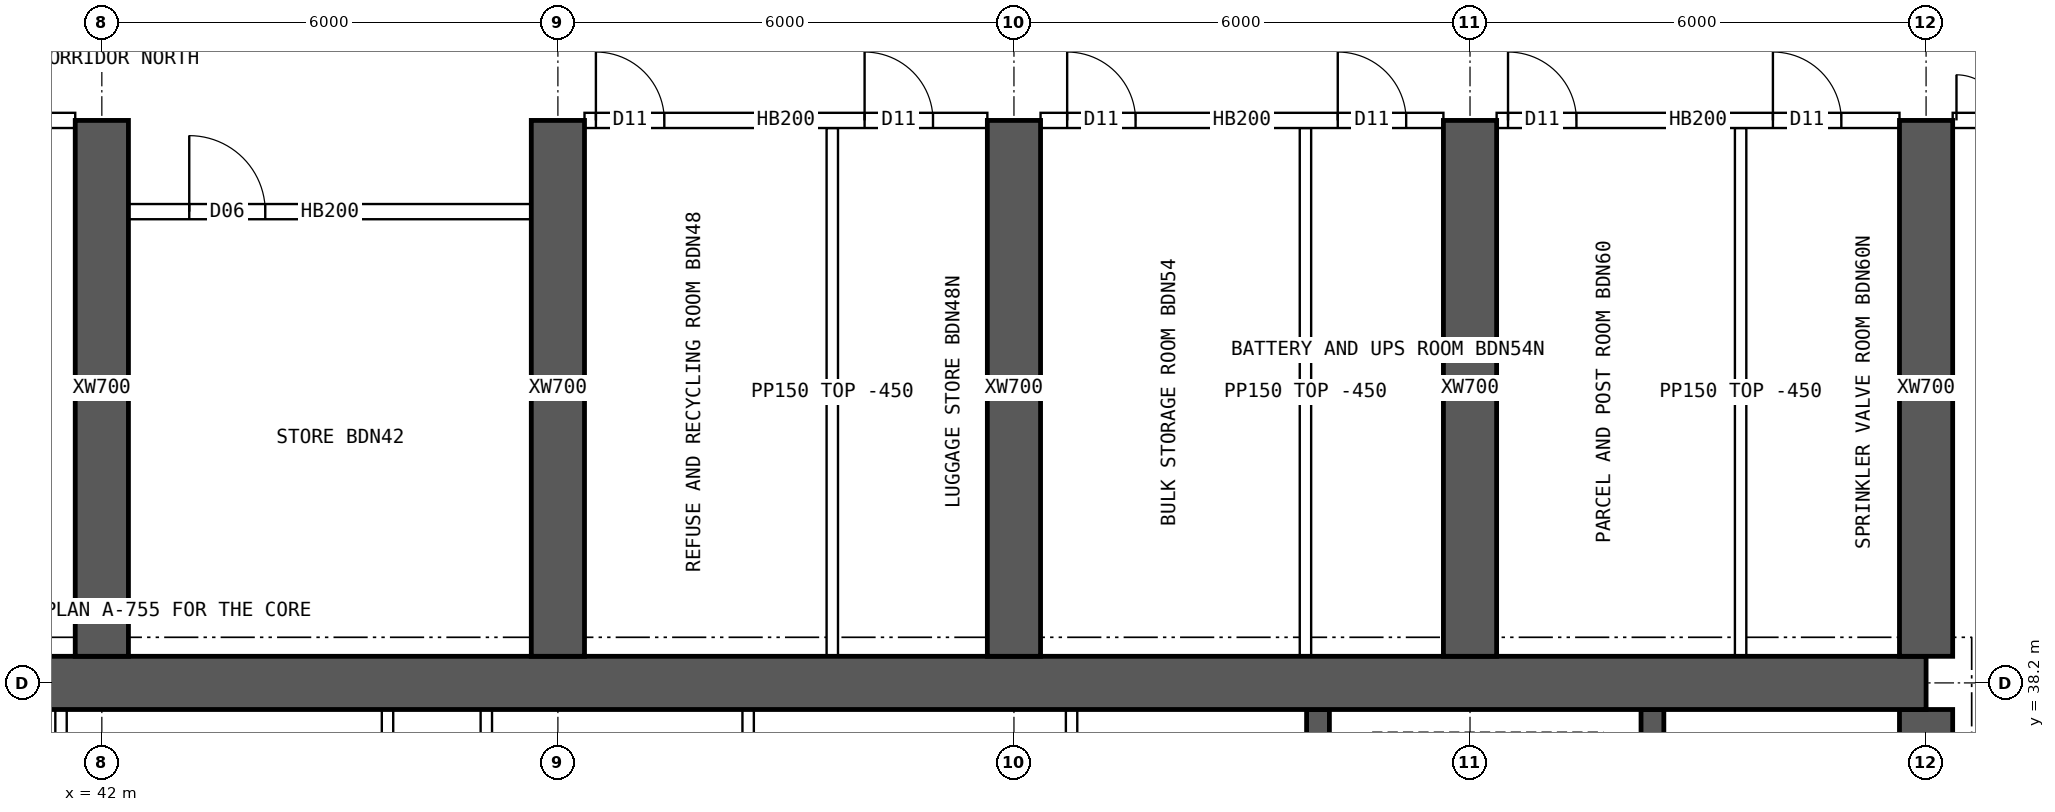
"""IFC4 building model, lengths in metres.
Left out: names, types, materials, properties, quantities, classifications, styles, units other than length and angle.
Written with IfcOpenShell. Run it as: python <this file> out.ifc"""

import sys

from ifc_helpers import new_model, si_unit, direction, frame, frame_2d, origin, place, context, subcontext, project, spatial, rectangle, extrude, element, fill, save


model = new_model("IFC4")
c1 = context("Model", 3, precision=1e-05, world=origin(), true_north=direction((0.0, 1.0)))
c2 = subcontext(c1, "Body", "Model", "MODEL_VIEW")
j1 = project(units=[si_unit("LENGTHUNIT", "METRE"), si_unit("PLANEANGLEUNIT", "RADIAN")], contexts=[c1])
p1 = place(None, origin())
s1 = spatial("IfcSite", under=j1, at=p1, CompositionType="ELEMENT")
p2 = place(p1, origin())
s2 = spatial("IfcBuilding", under=s1, at=p2, CompositionType="ELEMENT")
p3 = place(p2, frame((0.0, 0.0, 212.8)))
s3 = spatial("IfcBuildingStorey", under=s2, at=p3, CompositionType="ELEMENT", Elevation=212.8)
p4 = place(p3, frame((18.0, 38.2, 0.0), z_axis=(0.0, 0.0, 1.0), x_axis=(1.0, 0.0, 0.0)))
e1 = element("IfcWall", 1, at=p4, inside=s3, PredefinedType="SHEAR", context=c2, shape_type="SweptSolid", body=[
    extrude(rectangle(XDim=48.0, YDim=0.7, at=frame_2d((24.0, 0.0))), origin(), (0.0, 0.0, 1.0), 3.75),
])
p5 = place(p3, frame((66.0, 26.15, 0.0), z_axis=(0.0, 0.0, 1.0), x_axis=(0.0, 1.0, 0.0)))
e2 = element("IfcWall", 2, at=p5, inside=s3, PredefinedType="SHEAR", context=c2, shape_type="SweptSolid", body=[
    extrude(rectangle(XDim=11.7, YDim=0.7, at=frame_2d((5.85, 0.0))), origin(), (0.0, 0.0, 1.0), 3.75),
])
p6 = place(p5, frame((5.15, 0.0, 0.0)))
e3 = element("IfcOpeningElement", 3, at=p6, cuts=e2, PredefinedType="OPENING", context=c2, shape_type="SweptSolid", body=[
    extrude(rectangle(XDim=1.2, YDim=2.1, at=frame_2d((0.6, 1.05))), frame((0.0, 0.36, 0.0), z_axis=(0.0, -1.0, 0.0), x_axis=(1.0, 0.0, 0.0)), (0.0, 0.0, 1.0), 0.72),
])
for number, where, z_axis, x_axis in (
    (4, (62.4, 34.75, 0.0), (0.0, 0.0, 1.0), (0.0, 1.0, 0.0)),
    (5, (58.0, 34.75, 0.0), (0.0, 0.0, 1.0), (0.0, 1.0, 0.0)),
):
    element("IfcWall", number, at=place(p3, frame(where, z_axis=z_axis, x_axis=x_axis)), inside=s3, PredefinedType="SHEAR", context=c2, shape_type="SweptSolid", body=[
        extrude(rectangle(XDim=3.1, YDim=0.3, at=frame_2d((1.55, 0.0))), origin(), (0.0, 0.0, 1.0), 3.75),
    ])
for number, where, z_axis, x_axis in (
    (6, (42.0, 38.55, 0.0), (0.0, 0.0, 1.0), (0.0, 1.0, 0.0)),
    (7, (48.0, 38.55, 0.0), (0.0, 0.0, 1.0), (0.0, 1.0, 0.0)),
    (8, (54.0, 38.55, 0.0), (0.0, 0.0, 1.0), (0.0, 1.0, 0.0)),
    (9, (60.0, 38.55, 0.0), (0.0, 0.0, 1.0), (0.0, 1.0, 0.0)),
    (10, (66.0, 38.55, 0.0), (0.0, 0.0, 1.0), (0.0, 1.0, 0.0)),
):
    element("IfcWall", number, at=place(p3, frame(where, z_axis=z_axis, x_axis=x_axis)), inside=s3, PredefinedType="SHEAR", context=c2, shape_type="SweptSolid", body=[
        extrude(rectangle(XDim=7.05, YDim=0.7, at=frame_2d((3.525, 0.0))), origin(), (0.0, 0.0, 1.0), 3.75),
    ])
for number, where, z_axis, x_axis in (
    (11, (41.463, 34.75, 0.0), (0.0, 0.0, 1.0), (0.0, 1.0, 0.0)),
    (12, (45.758, 34.75, 0.0), (0.0, 0.0, 1.0), (0.0, 1.0, 0.0)),
    (13, (47.058, 34.75, 0.0), (0.0, 0.0, 1.0), (0.0, 1.0, 0.0)),
    (14, (50.503, 34.75, 0.0), (0.0, 0.0, 1.0), (0.0, 1.0, 0.0)),
    (15, (54.758, 34.75, 0.0), (0.0, 0.0, 1.0), (0.0, 1.0, 0.0)),
):
    element("IfcWall", number, at=place(p3, frame(where, z_axis=z_axis, x_axis=x_axis)), inside=s3, PredefinedType="SOLIDWALL", context=c2, shape_type="SweptSolid", body=[
        extrude(rectangle(XDim=3.1, YDim=0.15, at=frame_2d((1.55, 0.0))), origin(), (0.0, 0.0, 1.0), 3.3),
    ])
p7 = place(p3, frame((36.35, 45.6, 0.0), z_axis=(0.0, 0.0, 1.0), x_axis=(1.0, 0.0, 0.0)))
e16 = element("IfcWall", 16, at=p7, inside=s3, PredefinedType="SOLIDWALL", context=c2, shape_type="SweptSolid", body=[
    extrude(rectangle(XDim=5.3, YDim=0.2, at=frame_2d((2.65, 0.0))), origin(), (0.0, 0.0, 1.0), 3.3),
])
p8 = place(p7, frame((0.15, 0.0, 0.0)))
e17 = element("IfcOpeningElement", 17, at=p8, cuts=e16, PredefinedType="OPENING", context=c2, shape_type="SweptSolid", body=[
    extrude(rectangle(XDim=0.9, YDim=2.1, at=frame_2d((0.45, 1.05))), frame((0.0, 0.11, 0.0), z_axis=(0.0, -1.0, 0.0), x_axis=(1.0, 0.0, 0.0)), (0.0, 0.0, 1.0), 0.22),
])
p9 = place(p7, frame((2.15, 0.0, 0.0)))
e18 = element("IfcOpeningElement", 18, at=p9, cuts=e16, PredefinedType="OPENING", context=c2, shape_type="SweptSolid", body=[
    extrude(rectangle(XDim=0.9, YDim=2.1, at=frame_2d((0.45, 1.05))), frame((0.0, 0.11, 0.0), z_axis=(0.0, -1.0, 0.0), x_axis=(1.0, 0.0, 0.0)), (0.0, 0.0, 1.0), 0.22),
])
p10 = place(p3, frame((48.35, 45.6, 0.0), z_axis=(0.0, 0.0, 1.0), x_axis=(1.0, 0.0, 0.0)))
e19 = element("IfcWall", 19, at=p10, inside=s3, PredefinedType="SOLIDWALL", context=c2, shape_type="SweptSolid", body=[
    extrude(rectangle(XDim=5.3, YDim=0.2, at=frame_2d((2.65, 0.0))), origin(), (0.0, 0.0, 1.0), 3.3),
])
p11 = place(p10, frame((0.15, 0.0, 0.0)))
e20 = element("IfcOpeningElement", 20, at=p11, cuts=e19, PredefinedType="OPENING", context=c2, shape_type="SweptSolid", body=[
    extrude(rectangle(XDim=0.9, YDim=2.1, at=frame_2d((0.45, 1.05))), frame((0.0, 0.11, 0.0), z_axis=(0.0, -1.0, 0.0), x_axis=(1.0, 0.0, 0.0)), (0.0, 0.0, 1.0), 0.22),
])
p12 = place(p10, frame((3.685, 0.0, 0.0)))
e21 = element("IfcOpeningElement", 21, at=p12, cuts=e19, PredefinedType="OPENING", context=c2, shape_type="SweptSolid", body=[
    extrude(rectangle(XDim=0.9, YDim=2.1, at=frame_2d((0.45, 1.05))), frame((0.0, 0.11, 0.0), z_axis=(0.0, -1.0, 0.0), x_axis=(1.0, 0.0, 0.0)), (0.0, 0.0, 1.0), 0.22),
])
p13 = place(p3, frame((54.35, 45.6, 0.0), z_axis=(0.0, 0.0, 1.0), x_axis=(1.0, 0.0, 0.0)))
e22 = element("IfcWall", 22, at=p13, inside=s3, PredefinedType="SOLIDWALL", context=c2, shape_type="SweptSolid", body=[
    extrude(rectangle(XDim=5.3, YDim=0.2, at=frame_2d((2.65, 0.0))), origin(), (0.0, 0.0, 1.0), 3.3),
])
p14 = place(p13, frame((0.35, 0.0, 0.0)))
e23 = element("IfcOpeningElement", 23, at=p14, cuts=e22, PredefinedType="OPENING", context=c2, shape_type="SweptSolid", body=[
    extrude(rectangle(XDim=0.9, YDim=2.1, at=frame_2d((0.45, 1.05))), frame((0.0, 0.11, 0.0), z_axis=(0.0, -1.0, 0.0), x_axis=(1.0, 0.0, 0.0)), (0.0, 0.0, 1.0), 0.22),
])
p15 = place(p13, frame((3.91, 0.0, 0.0)))
e24 = element("IfcOpeningElement", 24, at=p15, cuts=e22, PredefinedType="OPENING", context=c2, shape_type="SweptSolid", body=[
    extrude(rectangle(XDim=0.9, YDim=2.1, at=frame_2d((0.45, 1.05))), frame((0.0, 0.11, 0.0), z_axis=(0.0, -1.0, 0.0), x_axis=(1.0, 0.0, 0.0)), (0.0, 0.0, 1.0), 0.22),
])
p16 = place(p3, frame((60.35, 45.6, 0.0), z_axis=(0.0, 0.0, 1.0), x_axis=(1.0, 0.0, 0.0)))
e25 = element("IfcWall", 25, at=p16, inside=s3, PredefinedType="SOLIDWALL", context=c2, shape_type="SweptSolid", body=[
    extrude(rectangle(XDim=5.3, YDim=0.2, at=frame_2d((2.65, 0.0))), origin(), (0.0, 0.0, 1.0), 3.3),
])
p17 = place(p16, frame((0.15, 0.0, 0.0)))
e26 = element("IfcOpeningElement", 26, at=p17, cuts=e25, PredefinedType="OPENING", context=c2, shape_type="SweptSolid", body=[
    extrude(rectangle(XDim=0.9, YDim=2.1, at=frame_2d((0.45, 1.05))), frame((0.0, 0.11, 0.0), z_axis=(0.0, -1.0, 0.0), x_axis=(1.0, 0.0, 0.0)), (0.0, 0.0, 1.0), 0.22),
])
p18 = place(p16, frame((3.635, 0.0, 0.0)))
e27 = element("IfcOpeningElement", 27, at=p18, cuts=e25, PredefinedType="OPENING", context=c2, shape_type="SweptSolid", body=[
    extrude(rectangle(XDim=0.9, YDim=2.1, at=frame_2d((0.45, 1.05))), frame((0.0, 0.11, 0.0), z_axis=(0.0, -1.0, 0.0), x_axis=(1.0, 0.0, 0.0)), (0.0, 0.0, 1.0), 0.22),
])
p19 = place(p3, frame((66.35, 45.6, 0.0), z_axis=(0.0, 0.0, 1.0), x_axis=(1.0, 0.0, 0.0)))
e28 = element("IfcWall", 28, at=p19, inside=s3, PredefinedType="SOLIDWALL", context=c2, shape_type="SweptSolid", body=[
    extrude(rectangle(XDim=2.05, YDim=0.2, at=frame_2d((1.025, 0.0))), origin(), (0.0, 0.0, 1.0), 3.3),
])
p20 = place(p19, frame((0.05, 0.0, 0.0)))
e29 = element("IfcOpeningElement", 29, at=p20, cuts=e28, PredefinedType="OPENING", context=c2, shape_type="SweptSolid", body=[
    extrude(rectangle(XDim=1.2, YDim=2.1, at=frame_2d((0.6, 1.05))), frame((0.0, 0.11, 0.0), z_axis=(0.0, -1.0, 0.0), x_axis=(1.0, 0.0, 0.0)), (0.0, 0.0, 1.0), 0.22),
])
p21 = place(p3, frame((42.35, 44.4, 0.0), z_axis=(0.0, 0.0, 1.0), x_axis=(1.0, 0.0, 0.0)))
e30 = element("IfcWall", 30, at=p21, inside=s3, PredefinedType="SOLIDWALL", context=c2, shape_type="SweptSolid", body=[
    extrude(rectangle(XDim=5.3, YDim=0.2, at=frame_2d((2.65, 0.0))), origin(), (0.0, 0.0, 1.0), 3.3),
])
p22 = place(p21, frame((0.8, 0.0, 0.0)))
e31 = element("IfcOpeningElement", 31, at=p22, cuts=e30, PredefinedType="OPENING", context=c2, shape_type="SweptSolid", body=[
    extrude(rectangle(XDim=1.0, YDim=2.1, at=frame_2d((0.5, 1.05))), frame((0.0, 0.11, 0.0), z_axis=(0.0, -1.0, 0.0), x_axis=(1.0, 0.0, 0.0)), (0.0, 0.0, 1.0), 0.22),
])
for number, where, z_axis, x_axis in (
    (32, (51.61, 38.55, 0.0), (0.0, 0.0, 1.0), (0.0, 1.0, 0.0)),
    (33, (57.835, 38.55, 0.0), (0.0, 0.0, 1.0), (0.0, 1.0, 0.0)),
    (34, (63.56, 38.55, 0.0), (0.0, 0.0, 1.0), (0.0, 1.0, 0.0)),
):
    element("IfcWall", number, at=place(p3, frame(where, z_axis=z_axis, x_axis=x_axis)), inside=s3, PredefinedType="PARTITIONING", context=c2, shape_type="SweptSolid", body=[
        extrude(rectangle(XDim=6.95, YDim=0.15, at=frame_2d((3.475, 0.0))), origin(), (0.0, 0.0, 1.0), 3.3),
    ])
p23 = place(p20, origin())
e35 = element("IfcDoor", 35, at=p23, inside=s3, OperationType="DOUBLE_DOOR_SINGLE_SWING", PredefinedType="DOOR", context=c2, shape_type="SweptSolid", body=[
    extrude(rectangle(XDim=1.2, YDim=2.1, at=frame_2d((0.6, 1.05))), frame((0.0, 0.025, 0.0), z_axis=(0.0, -1.0, 0.0), x_axis=(1.0, 0.0, 0.0)), (0.0, 0.0, 1.0), 0.05),
])
fill(e29, e35)
p24 = place(p22, origin())
e36 = element("IfcDoor", 36, at=p24, inside=s3, OperationType="SINGLE_SWING_LEFT", PredefinedType="DOOR", context=c2, shape_type="SweptSolid", body=[
    extrude(rectangle(XDim=1.0, YDim=2.1, at=frame_2d((0.5, 1.05))), frame((0.0, 0.025, 0.0), z_axis=(0.0, -1.0, 0.0), x_axis=(1.0, 0.0, 0.0)), (0.0, 0.0, 1.0), 0.05),
])
fill(e31, e36)
p25 = place(p11, origin())
e37 = element("IfcDoor", 37, at=p25, inside=s3, OperationType="SINGLE_SWING_LEFT", PredefinedType="DOOR", context=c2, shape_type="SweptSolid", body=[
    extrude(rectangle(XDim=0.9, YDim=2.1, at=frame_2d((0.45, 1.05))), frame((0.0, 0.025, 0.0), z_axis=(0.0, -1.0, 0.0), x_axis=(1.0, 0.0, 0.0)), (0.0, 0.0, 1.0), 0.05),
])
fill(e20, e37)
p26 = place(p12, origin())
e38 = element("IfcDoor", 38, at=p26, inside=s3, OperationType="SINGLE_SWING_LEFT", PredefinedType="DOOR", context=c2, shape_type="SweptSolid", body=[
    extrude(rectangle(XDim=0.9, YDim=2.1, at=frame_2d((0.45, 1.05))), frame((0.0, 0.025, 0.0), z_axis=(0.0, -1.0, 0.0), x_axis=(1.0, 0.0, 0.0)), (0.0, 0.0, 1.0), 0.05),
])
fill(e21, e38)
p27 = place(p14, origin())
e39 = element("IfcDoor", 39, at=p27, inside=s3, OperationType="SINGLE_SWING_LEFT", PredefinedType="DOOR", context=c2, shape_type="SweptSolid", body=[
    extrude(rectangle(XDim=0.9, YDim=2.1, at=frame_2d((0.45, 1.05))), frame((0.0, 0.025, 0.0), z_axis=(0.0, -1.0, 0.0), x_axis=(1.0, 0.0, 0.0)), (0.0, 0.0, 1.0), 0.05),
])
fill(e23, e39)
p28 = place(p15, origin())
e40 = element("IfcDoor", 40, at=p28, inside=s3, OperationType="SINGLE_SWING_LEFT", PredefinedType="DOOR", context=c2, shape_type="SweptSolid", body=[
    extrude(rectangle(XDim=0.9, YDim=2.1, at=frame_2d((0.45, 1.05))), frame((0.0, 0.025, 0.0), z_axis=(0.0, -1.0, 0.0), x_axis=(1.0, 0.0, 0.0)), (0.0, 0.0, 1.0), 0.05),
])
fill(e24, e40)
p29 = place(p17, origin())
e41 = element("IfcDoor", 41, at=p29, inside=s3, OperationType="SINGLE_SWING_LEFT", PredefinedType="DOOR", context=c2, shape_type="SweptSolid", body=[
    extrude(rectangle(XDim=0.9, YDim=2.1, at=frame_2d((0.45, 1.05))), frame((0.0, 0.025, 0.0), z_axis=(0.0, -1.0, 0.0), x_axis=(1.0, 0.0, 0.0)), (0.0, 0.0, 1.0), 0.05),
])
fill(e26, e41)
p30 = place(p18, origin())
e42 = element("IfcDoor", 42, at=p30, inside=s3, OperationType="SINGLE_SWING_LEFT", PredefinedType="DOOR", context=c2, shape_type="SweptSolid", body=[
    extrude(rectangle(XDim=0.9, YDim=2.1, at=frame_2d((0.45, 1.05))), frame((0.0, 0.025, 0.0), z_axis=(0.0, -1.0, 0.0), x_axis=(1.0, 0.0, 0.0)), (0.0, 0.0, 1.0), 0.05),
])
fill(e27, e42)
save(model, sys.argv[1])
